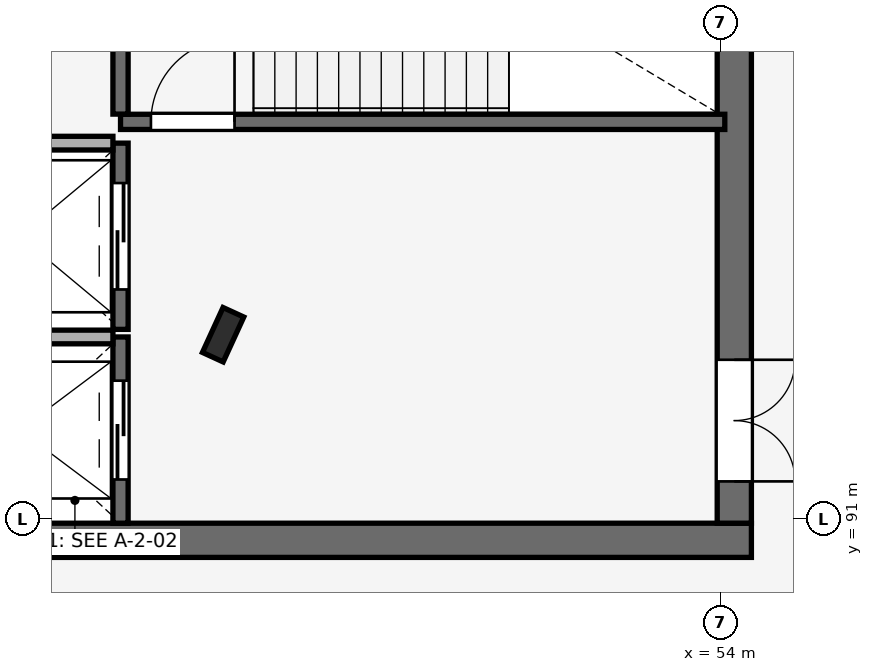
"""IFC4 building model, lengths in metres.
Left out: names, types, materials, properties, quantities, classifications, styles, units other than length and angle.
Written with IfcOpenShell. Run it as: python <this file> out.ifc"""

import sys

from ifc_helpers import new_model, si_unit, direction, frame, frame_2d, origin, origin_2d, place, context, subcontext, project, spatial, rectangle, i_section, extrude, element, fill, save


model = new_model("IFC4")
c1 = context("Model", 3, precision=1e-05, world=origin(), true_north=direction((0.0, 1.0)))
c2 = subcontext(c1, "Body", "Model", "MODEL_VIEW")
j1 = project(units=[si_unit("LENGTHUNIT", "METRE"), si_unit("PLANEANGLEUNIT", "RADIAN")], contexts=[c1])
p1 = place(None, origin())
s1 = spatial("IfcSite", under=j1, at=p1, CompositionType="ELEMENT")
p2 = place(p1, origin())
s2 = spatial("IfcBuilding", under=s1, at=p2, CompositionType="ELEMENT")
p3 = place(p2, frame((0.0, 0.0, 19.5)))
s3 = spatial("IfcBuildingStorey", under=s2, at=p3, CompositionType="ELEMENT", Elevation=19.5)
p4 = place(p3, frame((47.45, 93.43, 0.0), z_axis=(0.0, 0.0, 1.0), x_axis=(-0.909018020308, 0.416756810089, 0.0)))
e1 = element("IfcColumn", 1, at=p4, inside=s3, PredefinedType="COLUMN", context=c2, shape_type="SweptSolid", body=[
    extrude(i_section(OverallWidth=0.3, OverallDepth=0.65, WebThickness=0.016, FlangeThickness=0.031, FilletRadius=0.027, at=origin_2d()), origin(), (0.0, 0.0, 1.0), 4.5),
])
p5 = place(p3, frame((43.0, 90.725, 0.0), z_axis=(0.0, 0.0, 1.0), x_axis=(1.0, 0.0, 0.0)))
e2 = element("IfcWall", 2, at=p5, inside=s3, PredefinedType="SHEAR", context=c2, shape_type="SweptSolid", body=[
    extrude(rectangle(XDim=11.4, YDim=0.45, at=frame_2d((5.7, 0.0))), origin(), (0.0, 0.0, 1.0), 4.5),
])
p6 = place(p3, frame((54.175, 90.95, 0.0), z_axis=(0.0, 0.0, 1.0), x_axis=(0.0, 1.0, 0.0)))
e3 = element("IfcWall", 3, at=p6, inside=s3, PredefinedType="SHEAR", context=c2, shape_type="SweptSolid", body=[
    extrude(rectangle(XDim=9.1, YDim=0.45, at=frame_2d((4.55, 0.0))), origin(), (0.0, 0.0, 1.0), 4.5),
])
p7 = place(p6, frame((0.55, 0.0, 0.0)))
e4 = element("IfcOpeningElement", 4, at=p7, cuts=e3, PredefinedType="OPENING", context=c2, shape_type="SweptSolid", body=[
    extrude(rectangle(XDim=1.6, YDim=2.2, at=frame_2d((0.8, 1.1))), frame((0.0, 0.235, 0.0), z_axis=(0.0, -1.0, 0.0), x_axis=(1.0, 0.0, 0.0)), (0.0, 0.0, 1.0), 0.47),
])
p8 = place(p3, frame((46.1, 90.95, 0.0), z_axis=(0.0, 0.0, 1.0), x_axis=(0.0, 1.0, 0.0)))
e5 = element("IfcWall", 5, at=p8, inside=s3, PredefinedType="SHEAR", context=c2, shape_type="SweptSolid", body=[
    extrude(rectangle(XDim=2.45, YDim=0.2, at=frame_2d((1.225, 0.0))), origin(), (0.0, 0.0, 1.0), 4.25),
])
p9 = place(p8, frame((0.575, 0.0, 0.0)))
e6 = element("IfcOpeningElement", 6, at=p9, cuts=e5, PredefinedType="OPENING", context=c2, shape_type="SweptSolid", body=[
    extrude(rectangle(XDim=1.3, YDim=2.2, at=frame_2d((0.65, 1.1))), frame((0.0, 0.11, 0.0), z_axis=(0.0, -1.0, 0.0), x_axis=(1.0, 0.0, 0.0)), (0.0, 0.0, 1.0), 0.22),
])
p10 = place(p3, frame((43.55, 93.4, 0.0), z_axis=(0.0, 0.0, 1.0), x_axis=(1.0, 0.0, 0.0)))
e7 = element("IfcWall", 7, at=p10, inside=s3, PredefinedType="PARTITIONING", context=c2, shape_type="SweptSolid", body=[
    extrude(rectangle(XDim=2.45, YDim=0.18, at=frame_2d((1.225, 0.0))), origin(), (0.0, 0.0, 1.0), 4.5),
])
p11 = place(p3, frame((46.1, 93.5, 0.0), z_axis=(0.0, 0.0, 1.0), x_axis=(0.0, 1.0, 0.0)))
e8 = element("IfcWall", 8, at=p11, inside=s3, PredefinedType="SHEAR", context=c2, shape_type="SweptSolid", body=[
    extrude(rectangle(XDim=2.45, YDim=0.2, at=frame_2d((1.225, 0.0))), origin(), (0.0, 0.0, 1.0), 4.25),
])
p12 = place(p11, frame((0.525, 0.0, 0.0)))
e9 = element("IfcOpeningElement", 9, at=p12, cuts=e8, PredefinedType="OPENING", context=c2, shape_type="SweptSolid", body=[
    extrude(rectangle(XDim=1.4, YDim=2.2, at=frame_2d((0.7, 1.1))), frame((0.0, 0.11, 0.0), z_axis=(0.0, -1.0, 0.0), x_axis=(1.0, 0.0, 0.0)), (0.0, 0.0, 1.0), 0.22),
])
p13 = place(p3, frame((43.55, 95.95, 0.0), z_axis=(0.0, 0.0, 1.0), x_axis=(1.0, 0.0, 0.0)))
e10 = element("IfcWall", 10, at=p13, inside=s3, PredefinedType="PARTITIONING", context=c2, shape_type="SweptSolid", body=[
    extrude(rectangle(XDim=2.45, YDim=0.18, at=frame_2d((1.225, 0.0))), origin(), (0.0, 0.0, 1.0), 4.5),
])
p14 = place(p3, frame((46.1, 96.23, 0.0), z_axis=(0.0, 0.0, 1.0), x_axis=(1.0, 0.0, 0.0)))
e11 = element("IfcWall", 11, at=p14, inside=s3, PredefinedType="SHEAR", context=c2, shape_type="SweptSolid", body=[
    extrude(rectangle(XDim=7.95, YDim=0.2, at=frame_2d((3.975, 0.0))), origin(), (0.0, 0.0, 1.0), 4.5),
])
p15 = place(p14, frame((0.4, 0.0, 0.0)))
e12 = element("IfcOpeningElement", 12, at=p15, cuts=e11, PredefinedType="OPENING", context=c2, shape_type="SweptSolid", body=[
    extrude(rectangle(XDim=1.1, YDim=2.15, at=frame_2d((0.55, 1.075))), frame((0.0, 0.11, 0.0), z_axis=(0.0, -1.0, 0.0), x_axis=(1.0, 0.0, 0.0)), (0.0, 0.0, 1.0), 0.22),
])
p16 = place(p3, frame((46.1, 96.332, 0.0), z_axis=(0.0, 0.0, 1.0), x_axis=(0.0, 1.0, 0.0)))
e13 = element("IfcWall", 13, at=p16, inside=s3, PredefinedType="SHEAR", context=c2, shape_type="SweptSolid", body=[
    extrude(rectangle(XDim=3.686, YDim=0.2, at=frame_2d((1.843, 0.0))), origin(), (0.0, 0.0, 1.0), 4.5),
])
p17 = place(p9, origin())
e14 = element("IfcDoor", 14, at=p17, inside=s3, OperationType="DOUBLE_DOOR_SLIDING", PredefinedType="DOOR", context=c2, shape_type="SweptSolid", body=[
    extrude(rectangle(XDim=1.3, YDim=2.2, at=frame_2d((0.65, 1.1))), frame((0.0, 0.025, 0.0), z_axis=(0.0, -1.0, 0.0), x_axis=(1.0, 0.0, 0.0)), (0.0, 0.0, 1.0), 0.05),
])
fill(e6, e14)
p18 = place(p12, origin())
e15 = element("IfcDoor", 15, at=p18, inside=s3, OperationType="DOUBLE_DOOR_SLIDING", PredefinedType="DOOR", context=c2, shape_type="SweptSolid", body=[
    extrude(rectangle(XDim=1.4, YDim=2.2, at=frame_2d((0.7, 1.1))), frame((0.0, 0.025, 0.0), z_axis=(0.0, -1.0, 0.0), x_axis=(1.0, 0.0, 0.0)), (0.0, 0.0, 1.0), 0.05),
])
fill(e9, e15)
p19 = place(p15, frame((1.1, 0.0, 0.0), z_axis=(0.0, 0.0, 1.0), x_axis=(-1.0, 0.0, 0.0)))
e16 = element("IfcDoor", 16, at=p19, inside=s3, OperationType="SINGLE_SWING_LEFT", PredefinedType="DOOR", context=c2, shape_type="SweptSolid", body=[
    extrude(rectangle(XDim=1.1, YDim=2.15, at=frame_2d((0.55, 1.075))), frame((0.0, 0.025, 0.0), z_axis=(0.0, -1.0, 0.0), x_axis=(1.0, 0.0, 0.0)), (0.0, 0.0, 1.0), 0.05),
])
fill(e12, e16)
p20 = place(p7, frame((1.6, 0.0, 0.0), z_axis=(0.0, 0.0, 1.0), x_axis=(-1.0, 0.0, 0.0)))
e17 = element("IfcDoor", 17, at=p20, inside=s3, OperationType="DOUBLE_DOOR_SINGLE_SWING", PredefinedType="DOOR", context=c2, shape_type="SweptSolid", body=[
    extrude(rectangle(XDim=1.6, YDim=2.2, at=frame_2d((0.8, 1.1))), frame((0.0, 0.025, 0.0), z_axis=(0.0, -1.0, 0.0), x_axis=(1.0, 0.0, 0.0)), (0.0, 0.0, 1.0), 0.05),
])
fill(e4, e17)
save(model, sys.argv[1])
